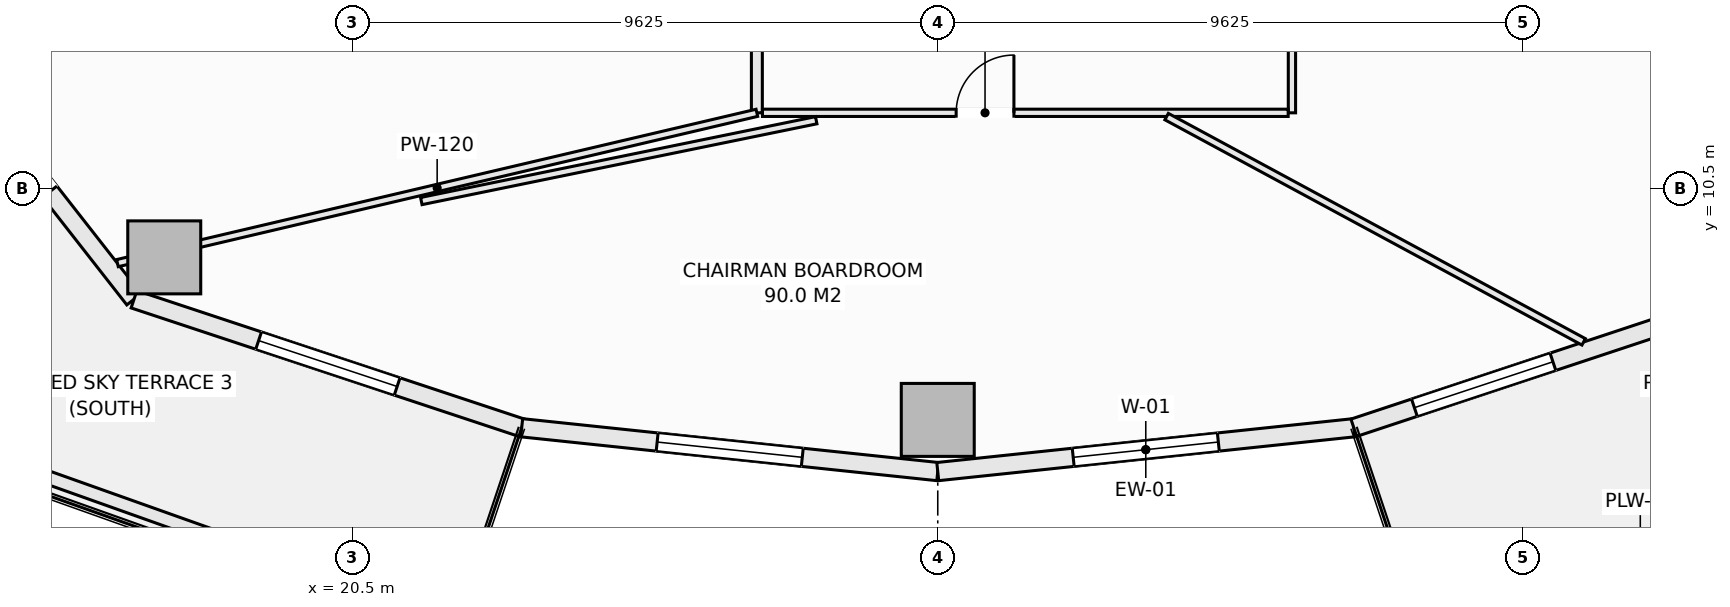
"""IFC4 building model, lengths in metres.
Left out: names, types, materials, properties, quantities, classifications, styles, units other than length and angle.
Written with IfcOpenShell. Run it as: python <this file> out.ifc"""

import sys

from ifc_helpers import new_model, si_unit, direction, frame, frame_2d, origin, origin_2d, place, context, subcontext, project, spatial, rectangle, extrude, element, fill, save


model = new_model("IFC4")
c1 = context("Model", 3, precision=1e-05, world=origin(), true_north=direction((0.0, 1.0)))
c2 = subcontext(c1, "Body", "Model", "MODEL_VIEW")
j1 = project(units=[si_unit("LENGTHUNIT", "METRE"), si_unit("PLANEANGLEUNIT", "RADIAN")], contexts=[c1])
p1 = place(None, origin())
s1 = spatial("IfcSite", under=j1, at=p1, CompositionType="ELEMENT")
p2 = place(p1, origin())
s2 = spatial("IfcBuilding", under=s1, at=p2, CompositionType="ELEMENT")
p3 = place(p2, frame((0.0, 0.0, 88.1)))
s3 = spatial("IfcBuildingStorey", under=s2, at=p3, CompositionType="ELEMENT", Elevation=88.1)
for number, where, z_axis, x_axis in (
    (1, (17.404, 9.373, -0.28), (0.0, 0.0, 1.0), (1.0, 0.0, 0.0)),
    (2, (30.125, 6.7, -0.28), (0.0, 0.0, 1.0), (1.0, 0.0, 0.0)),
):
    element("IfcColumn", number, at=place(p3, frame(where, z_axis=z_axis, x_axis=x_axis)), inside=s3, PredefinedType="COLUMN", context=c2, shape_type="SweptSolid", body=[
        extrude(rectangle(XDim=1.2, YDim=1.2, at=origin_2d()), origin(), (0.0, 0.0, 1.0), 3.85),
    ])
p4 = place(p3, frame((13.026, 13.64, 0.0), z_axis=(0.0, 0.0, 1.0), x_axis=(0.616434798832, -0.78740595552, 0.0)))
e3 = element("IfcWall", 3, at=p4, inside=s3, PredefinedType="SOLIDWALL", context=c2, shape_type="SweptSolid", body=[
    extrude(rectangle(XDim=6.294, YDim=0.3, at=frame_2d((3.147, 0.0))), origin(), (0.0, 0.0, 1.0), 3.093),
])
p5 = place(p4, frame((2.247, 0.0, 0.0)))
e4 = element("IfcOpeningElement", 4, at=p5, cuts=e3, PredefinedType="OPENING", context=c2, shape_type="SweptSolid", body=[
    extrude(rectangle(XDim=1.8, YDim=2.25, at=frame_2d((0.9, 1.125))), frame((0.0, 0.16, 0.0), z_axis=(0.0, -1.0, 0.0), x_axis=(1.0, 0.0, 0.0)), (0.0, 0.0, 1.0), 0.32),
])
p6 = place(p3, frame((16.906, 8.684, 0.0), z_axis=(0.0, 0.0, 1.0), x_axis=(0.949245153629, -0.314537181127, 0.0)))
e5 = element("IfcWall", 5, at=p6, inside=s3, PredefinedType="SOLIDWALL", context=c2, shape_type="SweptSolid", body=[
    extrude(rectangle(XDim=6.717, YDim=0.3, at=frame_2d((3.358, 0.0))), origin(), (0.0, 0.0, 1.0), 3.093),
])
p7 = place(p6, frame((2.159, 0.0, 0.85)))
e6 = element("IfcOpeningElement", 6, at=p7, cuts=e5, PredefinedType="OPENING", context=c2, shape_type="SweptSolid", body=[
    extrude(rectangle(XDim=2.4, YDim=1.9, at=frame_2d((1.2, 0.95))), frame((0.0, 0.16, 0.0), z_axis=(0.0, -1.0, 0.0), x_axis=(1.0, 0.0, 0.0)), (0.0, 0.0, 1.0), 0.32),
])
p8 = place(p3, frame((23.282, 6.571, 0.0), z_axis=(0.0, 0.0, 1.0), x_axis=(0.994498840295, -0.104747585419, 0.0)))
e7 = element("IfcWall", 7, at=p8, inside=s3, PredefinedType="SOLIDWALL", context=c2, shape_type="SweptSolid", body=[
    extrude(rectangle(XDim=6.88, YDim=0.3, at=frame_2d((3.44, 0.0))), origin(), (0.0, 0.0, 1.0), 3.093),
])
p9 = place(p8, frame((2.24, 0.0, 0.85)))
e8 = element("IfcOpeningElement", 8, at=p9, cuts=e7, PredefinedType="OPENING", context=c2, shape_type="SweptSolid", body=[
    extrude(rectangle(XDim=2.4, YDim=1.9, at=frame_2d((1.2, 0.95))), frame((0.0, 0.16, 0.0), z_axis=(0.0, -1.0, 0.0), x_axis=(1.0, 0.0, 0.0)), (0.0, 0.0, 1.0), 0.32),
])
p10 = place(p3, frame((30.125, 5.85, 0.0), z_axis=(0.0, 0.0, 1.0), x_axis=(0.994498840295, 0.104747585419, 0.0)))
e9 = element("IfcWall", 9, at=p10, inside=s3, PredefinedType="SOLIDWALL", context=c2, shape_type="SweptSolid", body=[
    extrude(rectangle(XDim=6.88, YDim=0.3, at=frame_2d((3.44, 0.0))), origin(), (0.0, 0.0, 1.0), 3.093),
])
p11 = place(p10, frame((2.24, 0.0, 0.85)))
e10 = element("IfcOpeningElement", 10, at=p11, cuts=e9, PredefinedType="OPENING", context=c2, shape_type="SweptSolid", body=[
    extrude(rectangle(XDim=2.4, YDim=1.9, at=frame_2d((1.2, 0.95))), frame((0.0, 0.16, 0.0), z_axis=(0.0, -1.0, 0.0), x_axis=(1.0, 0.0, 0.0)), (0.0, 0.0, 1.0), 0.32),
])
p12 = place(p3, frame((36.968, 6.571, 0.0), z_axis=(0.0, 0.0, 1.0), x_axis=(0.949245153629, 0.314537181127, 0.0)))
e11 = element("IfcWall", 11, at=p12, inside=s3, PredefinedType="SOLIDWALL", context=c2, shape_type="SweptSolid", body=[
    extrude(rectangle(XDim=6.717, YDim=0.3, at=frame_2d((3.358, 0.0))), origin(), (0.0, 0.0, 1.0), 3.093),
])
p13 = place(p12, frame((1.05, 0.0, 0.85)))
e12 = element("IfcOpeningElement", 12, at=p13, cuts=e11, PredefinedType="OPENING", context=c2, shape_type="SweptSolid", body=[
    extrude(rectangle(XDim=2.4, YDim=1.9, at=frame_2d((1.2, 0.95))), frame((0.0, 0.16, 0.0), z_axis=(0.0, -1.0, 0.0), x_axis=(1.0, 0.0, 0.0)), (0.0, 0.0, 1.0), 0.32),
])
for number, where, z_axis, x_axis in (
    (13, (14.893, 5.965, 0.0), (0.0, 0.0, 1.0), (0.942, -0.335, 0.0)),
    (14, (38.001, 3.349, 0.0), (0.0, 0.0, 1.0), (0.942, 0.335, 0.0)),
):
    element("IfcWall", number, at=place(p3, frame(where, z_axis=z_axis, x_axis=x_axis)), inside=s3, PredefinedType="PARAPET", context=c2, shape_type="SweptSolid", body=[
        extrude(rectangle(XDim=7.807, YDim=0.22, at=frame_2d((3.904, 0.0))), origin(), (0.0, 0.0, 1.0), 0.52),
    ])
p14 = place(p3, frame((27.15, 11.75, 0.0), z_axis=(0.0, 0.0, 1.0), x_axis=(0.0, 1.0, 0.0)))
e15 = element("IfcWall", 15, at=p14, inside=s3, PredefinedType="SOLIDWALL", context=c2, shape_type="SweptSolid", body=[
    extrude(rectangle(XDim=5.208, YDim=0.18, at=frame_2d((2.604, 0.0))), origin(), (0.0, 0.0, 1.0), 3.57),
])
p15 = place(p14, frame((1.535, 0.0, 0.0)))
e16 = element("IfcOpeningElement", 16, at=p15, cuts=e15, PredefinedType="OPENING", context=c2, shape_type="SweptSolid", body=[
    extrude(rectangle(XDim=0.95, YDim=2.1, at=frame_2d((0.475, 1.05))), frame((0.0, 0.1, 0.0), z_axis=(0.0, -1.0, 0.0), x_axis=(1.0, 0.0, 0.0)), (0.0, 0.0, 1.0), 0.2),
])
p16 = place(p3, frame((35.95, 11.75, 0.0), z_axis=(0.0, 0.0, 1.0), x_axis=(0.0, 1.0, 0.0)))
e17 = element("IfcWall", 17, at=p16, inside=s3, PredefinedType="PARTITIONING", context=c2, shape_type="SweptSolid", body=[
    extrude(rectangle(XDim=3.838, YDim=0.12, at=frame_2d((1.919, 0.0))), origin(), (0.0, 0.0, 1.0), 3.57),
])
p17 = place(p3, frame((27.242, 11.75, 0.0), z_axis=(0.0, 0.0, 1.0), x_axis=(1.0, 0.0, 0.0)))
e18 = element("IfcWall", 18, at=p17, inside=s3, PredefinedType="PARTITIONING", context=c2, shape_type="SweptSolid", body=[
    extrude(rectangle(XDim=8.646, YDim=0.12, at=frame_2d((4.323, 0.0))), origin(), (0.0, 0.0, 1.0), 3.57),
])
p18 = place(p17, frame((3.186, 0.0, 0.0)))
e19 = element("IfcOpeningElement", 19, at=p18, cuts=e18, PredefinedType="OPENING", context=c2, shape_type="SweptSolid", body=[
    extrude(rectangle(XDim=0.95, YDim=2.1, at=frame_2d((0.475, 1.05))), frame((0.0, 0.07, 0.0), z_axis=(0.0, -1.0, 0.0), x_axis=(1.0, 0.0, 0.0)), (0.0, 0.0, 1.0), 0.14),
])
p19 = place(p3, frame((33.889, 11.688, 0.0), z_axis=(0.0, 0.0, 1.0), x_axis=(0.879862970093, -0.475227475909, 0.0)))
e20 = element("IfcWall", 20, at=p19, inside=s3, PredefinedType="PARTITIONING", context=c2, shape_type="SweptSolid", body=[
    extrude(rectangle(XDim=7.795, YDim=0.12, at=frame_2d((3.898, 0.0))), origin(), (0.0, 0.0, 1.0), 3.57),
])
p20 = place(p3, frame((16.634, 9.278, 0.0), z_axis=(0.0, 0.0, 1.0), x_axis=(0.973467827541, 0.228823925195, 0.0)))
e21 = element("IfcWall", 21, at=p20, inside=s3, PredefinedType="PARTITIONING", context=c2, shape_type="SweptSolid", body=[
    extrude(rectangle(XDim=10.803, YDim=0.12, at=frame_2d((5.401, 0.0))), origin(), (0.0, 0.0, 1.0), 3.093),
])
p21 = place(p3, frame((21.632, 10.299, 0.0), z_axis=(0.0, 0.0, 1.0), x_axis=(0.979686821634, 0.200533616924, 0.0)))
e22 = element("IfcWall", 22, at=p21, inside=s3, PredefinedType="PARTITIONING", context=c2, shape_type="SweptSolid", body=[
    extrude(rectangle(XDim=6.629, YDim=0.12, at=frame_2d((3.314, 0.0))), origin(), (0.0, 0.0, 1.0), 3.57),
])
p22 = place(p7, origin())
e23 = element("IfcWindow", 23, at=p22, inside=s3, PartitioningType="SINGLE_PANEL", PredefinedType="WINDOW", context=c2, shape_type="SweptSolid", body=[
    extrude(rectangle(XDim=2.4, YDim=1.9, at=frame_2d((1.2, 0.95))), frame((0.0, 0.03, 0.0), z_axis=(0.0, -1.0, 0.0), x_axis=(1.0, 0.0, 0.0)), (0.0, 0.0, 1.0), 0.06),
])
fill(e6, e23)
p23 = place(p9, origin())
e24 = element("IfcWindow", 24, at=p23, inside=s3, PartitioningType="SINGLE_PANEL", PredefinedType="WINDOW", context=c2, shape_type="SweptSolid", body=[
    extrude(rectangle(XDim=2.4, YDim=1.9, at=frame_2d((1.2, 0.95))), frame((0.0, 0.03, 0.0), z_axis=(0.0, -1.0, 0.0), x_axis=(1.0, 0.0, 0.0)), (0.0, 0.0, 1.0), 0.06),
])
fill(e8, e24)
p24 = place(p11, origin())
e25 = element("IfcWindow", 25, at=p24, inside=s3, PartitioningType="SINGLE_PANEL", PredefinedType="WINDOW", context=c2, shape_type="SweptSolid", body=[
    extrude(rectangle(XDim=2.4, YDim=1.9, at=frame_2d((1.2, 0.95))), frame((0.0, 0.03, 0.0), z_axis=(0.0, -1.0, 0.0), x_axis=(1.0, 0.0, 0.0)), (0.0, 0.0, 1.0), 0.06),
])
fill(e10, e25)
p25 = place(p13, origin())
e26 = element("IfcWindow", 26, at=p25, inside=s3, PartitioningType="SINGLE_PANEL", PredefinedType="WINDOW", context=c2, shape_type="SweptSolid", body=[
    extrude(rectangle(XDim=2.4, YDim=1.9, at=frame_2d((1.2, 0.95))), frame((0.0, 0.03, 0.0), z_axis=(0.0, -1.0, 0.0), x_axis=(1.0, 0.0, 0.0)), (0.0, 0.0, 1.0), 0.06),
])
fill(e12, e26)
p26 = place(p18, origin())
e27 = element("IfcDoor", 27, at=p26, inside=s3, OperationType="SINGLE_SWING_RIGHT", PredefinedType="DOOR", context=c2, shape_type="SweptSolid", body=[
    extrude(rectangle(XDim=0.95, YDim=2.1, at=frame_2d((0.475, 1.05))), frame((0.0, 0.025, 0.0), z_axis=(0.0, -1.0, 0.0), x_axis=(1.0, 0.0, 0.0)), (0.0, 0.0, 1.0), 0.05),
])
fill(e19, e27)
save(model, sys.argv[1])
